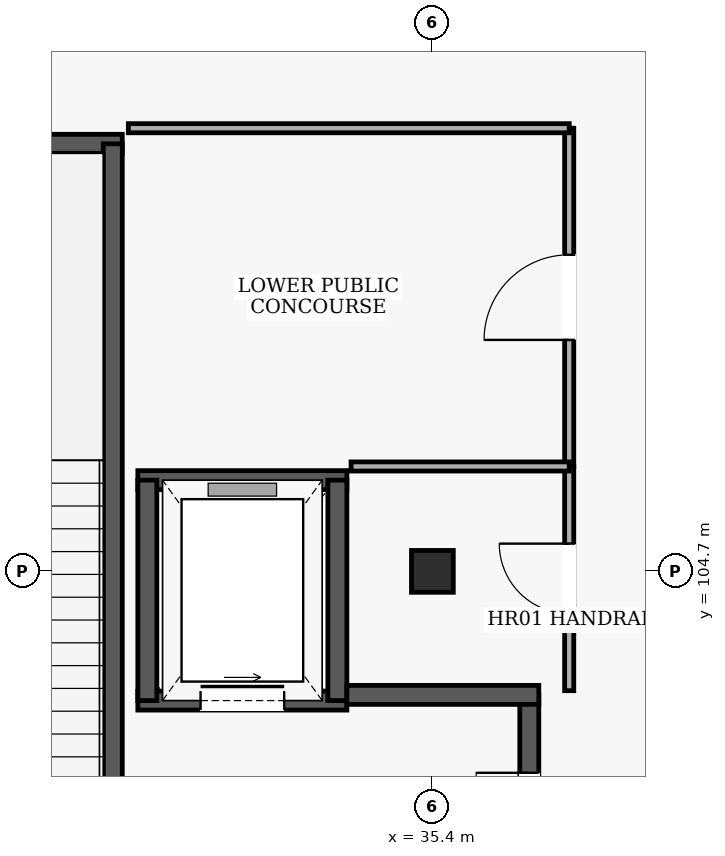
"""IFC4 building model, lengths in metres.
Left out: names, types, materials, properties, quantities, classifications, styles, units other than length and angle.
Written with IfcOpenShell. Run it as: python <this file> out.ifc"""

import sys

from ifc_helpers import new_model, si_unit, direction, frame, frame_2d, origin, origin_2d, place, context, subcontext, project, spatial, rectangle, extrude, element, fill, save


model = new_model("IFC4")
c1 = context("Model", 3, precision=1e-05, world=origin(), true_north=direction((0.0, 1.0)))
c2 = subcontext(c1, "Body", "Model", "MODEL_VIEW")
j1 = project(units=[si_unit("LENGTHUNIT", "METRE"), si_unit("PLANEANGLEUNIT", "RADIAN")], contexts=[c1])
p1 = place(None, origin())
s1 = spatial("IfcSite", under=j1, at=p1, CompositionType="ELEMENT")
p2 = place(p1, origin())
s2 = spatial("IfcBuilding", under=s1, at=p2, CompositionType="ELEMENT")
p3 = place(p2, frame((0.0, 0.0, 5.4)))
s3 = spatial("IfcBuildingStorey", under=s2, at=p3, CompositionType="ELEMENT", Elevation=5.4)
p4 = place(p3, frame((35.4, 104.7, 0.0), z_axis=(0.0, 0.0, 1.0), x_axis=(1.0, 0.0, 0.0)))
e1 = element("IfcColumn", 1, at=p4, inside=s3, PredefinedType="COLUMN", context=c2, shape_type="SweptSolid", body=[
    extrude(rectangle(XDim=0.55, YDim=0.55, at=origin_2d()), origin(), (0.0, 0.0, 1.0), 4.8),
])
p5 = place(p3, frame((31.32, 110.325, 0.0), z_axis=(0.0, 0.0, 1.0), x_axis=(-1.0, 0.0, 0.0)))
e2 = element("IfcWall", 2, at=p5, inside=s3, PredefinedType="SHEAR", context=c2, shape_type="SweptSolid", body=[
    extrude(rectangle(XDim=5.37, YDim=0.25, at=frame_2d((2.685, 0.0))), origin(), (0.0, 0.0, 1.0), 4.5),
])
p6 = place(p3, frame((31.195, 99.475, 0.0), z_axis=(0.0, 0.0, 1.0), x_axis=(0.0, 1.0, 0.0)))
e3 = element("IfcWall", 3, at=p6, inside=s3, PredefinedType="SHEAR", context=c2, shape_type="SweptSolid", body=[
    extrude(rectangle(XDim=10.85, YDim=0.25, at=frame_2d((5.425, 0.0))), origin(), (0.0, 0.0, 1.0), 4.5),
])
p7 = place(p6, frame((0.52, 0.0, 0.0)))
e4 = element("IfcOpeningElement", 4, at=p7, cuts=e3, PredefinedType="OPENING", context=c2, shape_type="SweptSolid", body=[
    extrude(rectangle(XDim=1.4, YDim=2.15, at=frame_2d((0.7, 1.075))), frame((0.0, 0.135, 0.0), z_axis=(0.0, -1.0, 0.0), x_axis=(1.0, 0.0, 0.0)), (0.0, 0.0, 1.0), 0.27),
])
p8 = place(p3, frame((31.525, 103.0, 0.0), z_axis=(0.0, 0.0, 1.0), x_axis=(1.0, 0.0, 0.0)))
e5 = element("IfcWall", 5, at=p8, inside=s3, PredefinedType="SHEAR", context=c2, shape_type="SweptSolid", body=[
    extrude(rectangle(XDim=2.75, YDim=0.25, at=frame_2d((1.375, 0.0))), origin(), (0.0, 0.0, 1.0), 4.5),
])
p9 = place(p8, frame((0.825, 0.0, 0.0)))
e6 = element("IfcOpeningElement", 6, at=p9, cuts=e5, PredefinedType="OPENING", context=c2, shape_type="SweptSolid", body=[
    extrude(rectangle(XDim=1.1, YDim=2.15, at=frame_2d((0.55, 1.075))), frame((0.0, 0.135, 0.0), z_axis=(0.0, -1.0, 0.0), x_axis=(1.0, 0.0, 0.0)), (0.0, 0.0, 1.0), 0.27),
])
p10 = place(p3, frame((34.275, 105.9, 0.0), z_axis=(0.0, 0.0, 1.0), x_axis=(-1.0, 0.0, 0.0)))
e7 = element("IfcWall", 7, at=p10, inside=s3, PredefinedType="SHEAR", context=c2, shape_type="SweptSolid", body=[
    extrude(rectangle(XDim=2.75, YDim=0.25, at=frame_2d((1.375, 0.0))), origin(), (0.0, 0.0, 1.0), 4.5),
])
for number, where, z_axis, x_axis in (
    (8, (31.65, 105.9, 0.0), (0.0, 0.0, 1.0), (0.0, -1.0, 0.0)),
    (9, (34.15, 103.0, 0.0), (0.0, 0.0, 1.0), (0.0, 1.0, 0.0)),
):
    element("IfcWall", number, at=place(p3, frame(where, z_axis=z_axis, x_axis=x_axis)), inside=s3, PredefinedType="SHEAR", context=c2, shape_type="SweptSolid", body=[
        extrude(rectangle(XDim=2.9, YDim=0.25, at=frame_2d((1.45, 0.0))), origin(), (0.0, 0.0, 1.0), 4.5),
    ])
p11 = place(p3, frame((36.675, 99.625, 0.0), z_axis=(0.0, 0.0, 1.0), x_axis=(0.0, 1.0, 0.0)))
e10 = element("IfcWall", 10, at=p11, inside=s3, PredefinedType="SHEAR", context=c2, shape_type="SweptSolid", body=[
    extrude(rectangle(XDim=3.45, YDim=0.25, at=frame_2d((1.725, 0.0))), origin(), (0.0, 0.0, 1.0), 4.5),
])
p12 = place(p11, frame((1.025, 0.0, 0.0)))
e11 = element("IfcOpeningElement", 11, at=p12, cuts=e10, PredefinedType="OPENING", context=c2, shape_type="SweptSolid", body=[
    extrude(rectangle(XDim=1.4, YDim=2.15, at=frame_2d((0.7, 1.075))), frame((0.0, 0.135, 0.0), z_axis=(0.0, -1.0, 0.0), x_axis=(1.0, 0.0, 0.0)), (0.0, 0.0, 1.0), 0.27),
])
p13 = place(p3, frame((34.275, 103.075, 0.0), z_axis=(0.0, 0.0, 1.0), x_axis=(1.0, 0.0, 0.0)))
e12 = element("IfcWall", 12, at=p13, inside=s3, PredefinedType="SHEAR", context=c2, shape_type="SweptSolid", body=[
    extrude(rectangle(XDim=2.525, YDim=0.25, at=frame_2d((1.263, 0.0))), origin(), (0.0, 0.0, 1.0), 4.5),
])
p14 = place(p3, frame((37.2, 106.08, 0.0), z_axis=(0.0, 0.0, 1.0), x_axis=(0.0, 1.0, 0.0)))
e13 = element("IfcWall", 13, at=p14, inside=s3, PredefinedType="PARTITIONING", context=c2, shape_type="SweptSolid", body=[
    extrude(rectangle(XDim=4.45, YDim=0.12, at=frame_2d((2.225, 0.0))), origin(), (0.0, 0.0, 1.0), 4.5),
])
p15 = place(p14, frame((1.665, 0.0, 0.0)))
e14 = element("IfcOpeningElement", 14, at=p15, cuts=e13, PredefinedType="OPENING", context=c2, shape_type="SweptSolid", body=[
    extrude(rectangle(XDim=1.12, YDim=2.15, at=frame_2d((0.56, 1.075))), frame((0.0, 0.07, 0.0), z_axis=(0.0, -1.0, 0.0), x_axis=(1.0, 0.0, 0.0)), (0.0, 0.0, 1.0), 0.14),
])
p16 = place(p3, frame((37.2, 110.53, 0.0), z_axis=(0.0, 0.0, 1.0), x_axis=(-1.0, 0.0, 0.0)))
e15 = element("IfcWall", 15, at=p16, inside=s3, PredefinedType="PARTITIONING", context=c2, shape_type="SweptSolid", body=[
    extrude(rectangle(XDim=5.8, YDim=0.12, at=frame_2d((2.9, 0.0))), origin(), (0.0, 0.0, 1.0), 4.5),
])
p17 = place(p3, frame((37.2, 103.13, 0.0), z_axis=(0.0, 0.0, 1.0), x_axis=(0.0, 1.0, 0.0)))
e16 = element("IfcWall", 16, at=p17, inside=s3, PredefinedType="PARTITIONING", context=c2, shape_type="SweptSolid", body=[
    extrude(rectangle(XDim=2.95, YDim=0.12, at=frame_2d((1.475, 0.0))), origin(), (0.0, 0.0, 1.0), 4.5),
])
p18 = place(p17, frame((1.015, 0.0, 0.0)))
e17 = element("IfcOpeningElement", 17, at=p18, cuts=e16, PredefinedType="OPENING", context=c2, shape_type="SweptSolid", body=[
    extrude(rectangle(XDim=0.92, YDim=2.1, at=frame_2d((0.46, 1.05))), frame((0.0, 0.07, 0.0), z_axis=(0.0, -1.0, 0.0), x_axis=(1.0, 0.0, 0.0)), (0.0, 0.0, 1.0), 0.14),
])
p19 = place(p3, frame((37.2, 106.08, 0.0), z_axis=(0.0, 0.0, 1.0), x_axis=(-1.0, 0.0, 0.0)))
e18 = element("IfcWall", 18, at=p19, inside=s3, PredefinedType="PARTITIONING", context=c2, shape_type="SweptSolid", body=[
    extrude(rectangle(XDim=2.87, YDim=0.12, at=frame_2d((1.435, 0.0))), origin(), (0.0, 0.0, 1.0), 4.5),
])
p20 = place(p9, origin())
e19 = element("IfcDoor", 19, at=p20, inside=s3, OperationType="SLIDING_TO_LEFT", PredefinedType="DOOR", context=c2, shape_type="SweptSolid", body=[
    extrude(rectangle(XDim=1.1, YDim=2.15, at=frame_2d((0.55, 1.075))), frame((0.0, 0.025, 0.0), z_axis=(0.0, -1.0, 0.0), x_axis=(1.0, 0.0, 0.0)), (0.0, 0.0, 1.0), 0.05),
])
fill(e6, e19)
p21 = place(p12, origin())
e20 = element("IfcDoor", 20, at=p21, inside=s3, OperationType="DOUBLE_DOOR_SINGLE_SWING", PredefinedType="DOOR", context=c2, shape_type="SweptSolid", body=[
    extrude(rectangle(XDim=1.4, YDim=2.15, at=frame_2d((0.7, 1.075))), frame((0.0, 0.025, 0.0), z_axis=(0.0, -1.0, 0.0), x_axis=(1.0, 0.0, 0.0)), (0.0, 0.0, 1.0), 0.05),
])
fill(e11, e20)
p22 = place(p15, origin())
e21 = element("IfcDoor", 21, at=p22, inside=s3, OperationType="SINGLE_SWING_LEFT", PredefinedType="DOOR", context=c2, shape_type="SweptSolid", body=[
    extrude(rectangle(XDim=1.12, YDim=2.15, at=frame_2d((0.56, 1.075))), frame((0.0, 0.025, 0.0), z_axis=(0.0, -1.0, 0.0), x_axis=(1.0, 0.0, 0.0)), (0.0, 0.0, 1.0), 0.05),
])
fill(e14, e21)
p23 = place(p18, origin())
e22 = element("IfcDoor", 22, at=p23, inside=s3, OperationType="SINGLE_SWING_RIGHT", PredefinedType="DOOR", context=c2, shape_type="SweptSolid", body=[
    extrude(rectangle(XDim=0.92, YDim=2.1, at=frame_2d((0.46, 1.05))), frame((0.0, 0.025, 0.0), z_axis=(0.0, -1.0, 0.0), x_axis=(1.0, 0.0, 0.0)), (0.0, 0.0, 1.0), 0.05),
])
fill(e17, e22)
save(model, sys.argv[1])
